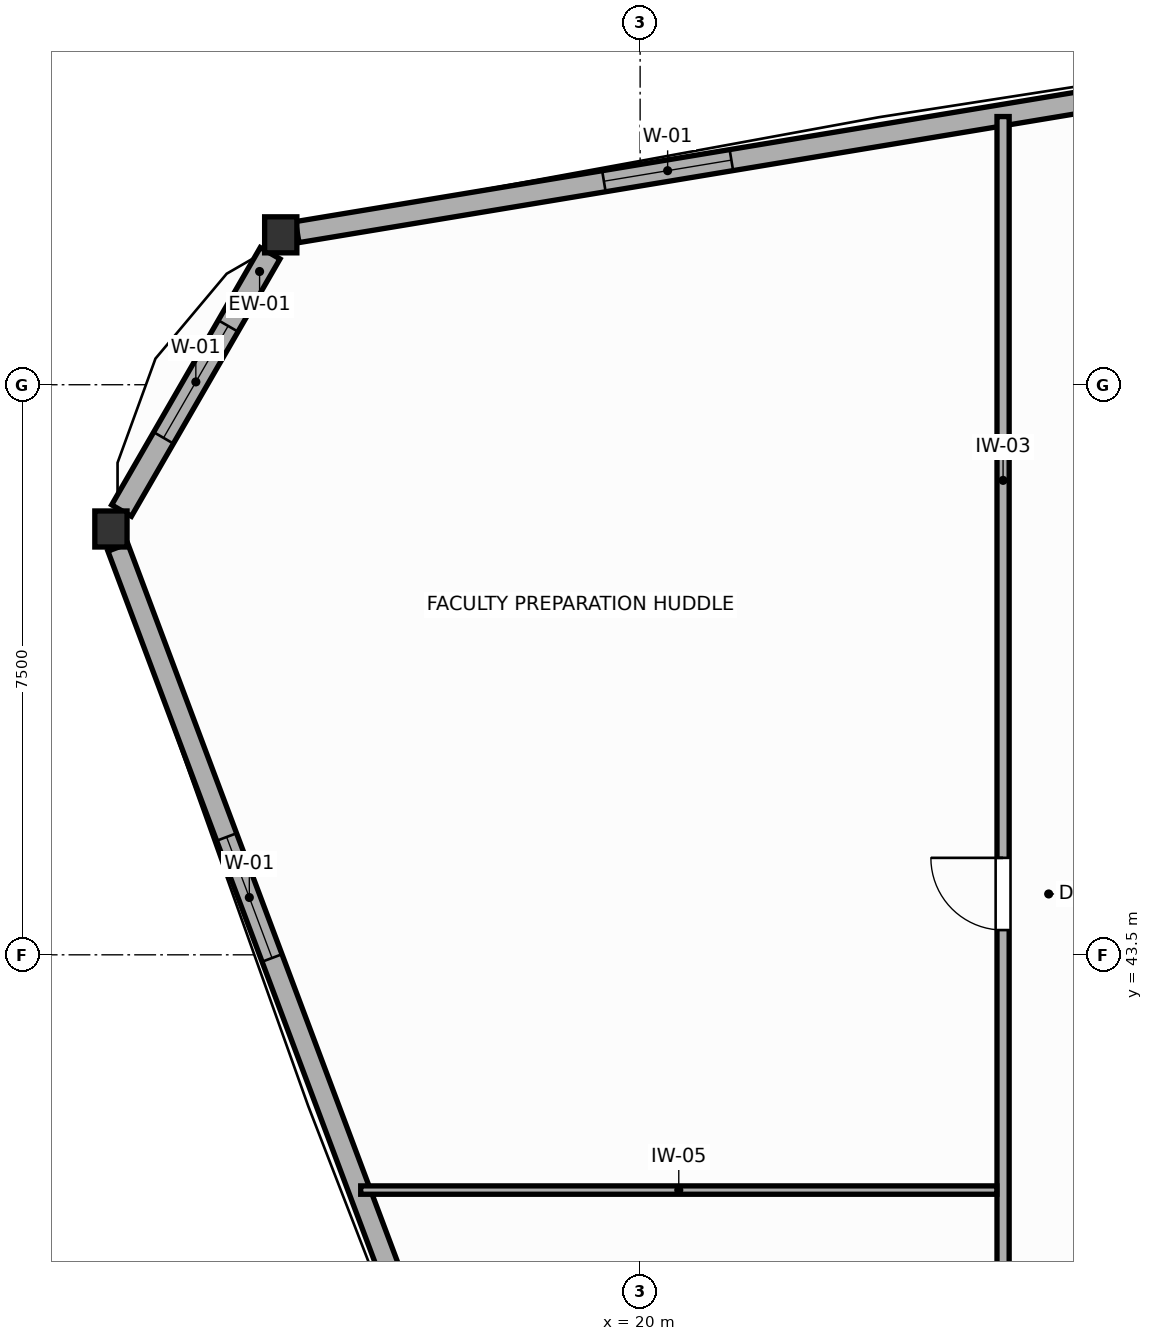
"""IFC4 building model, lengths in metres.
Left out: names, types, materials, properties, quantities, classifications, styles, units other than length and angle.
Written with IfcOpenShell. Run it as: python <this file> out.ifc"""

import sys

from ifc_helpers import new_model, si_unit, direction, frame, frame_2d, origin, origin_2d, place, context, subcontext, project, spatial, rectangle, i_section, extrude, source, transform, mapped, element, fill, save


model = new_model("IFC4")
c1 = context("Model", 3, precision=1e-05, world=origin(), true_north=direction((0.0, 1.0)))
c2 = subcontext(c1, "Body", "Model", "MODEL_VIEW")
j1 = project(units=[si_unit("LENGTHUNIT", "METRE"), si_unit("PLANEANGLEUNIT", "RADIAN")], contexts=[c1])
p1 = place(None, origin())
s1 = spatial("IfcSite", under=j1, at=p1, CompositionType="ELEMENT")
p2 = place(p1, origin())
s2 = spatial("IfcBuilding", under=s1, at=p2, CompositionType="ELEMENT")
p3 = place(p2, frame((0.0, 0.0, 75.6)))
s3 = spatial("IfcBuildingStorey", under=s2, at=p3, CompositionType="ELEMENT", Elevation=75.6)
m1 = source(origin(), c2, "Body", "SweptSolid", [
    extrude(i_section(OverallWidth=0.424, OverallDepth=0.474, WebThickness=0.045, FlangeThickness=0.072, FilletRadius=0.015, at=origin_2d()), origin(), (0.0, 0.0, 1.0), 3.9),
])
for number, where, z_axis, x_axis in (
    (1, (15.272, 52.972, 0.0), (0.0, 0.0, 1.0), (1.0, 0.0, 0.0)),
    (2, (13.038, 49.102, 0.0), (0.0, 0.0, 1.0), (1.0, 0.0, 0.0)),
):
    element("IfcColumn", number, at=place(p3, frame(where, z_axis=z_axis, x_axis=x_axis)), inside=s3, PredefinedType="COLUMN", context=c2, shape_type="MappedRepresentation", body=[
        mapped(m1, transform((0.0, 0.0, 0.0), scale=1.0)),
    ])
p4 = place(p3, frame((32.514, 55.832, 0.0), z_axis=(0.0, 0.0, 1.0), x_axis=(-0.986523610756, -0.163618964122, 0.0)))
e3 = element("IfcWall", 3, at=p4, inside=s3, PredefinedType="SOLIDWALL", context=c2, shape_type="SweptSolid", body=[
    extrude(rectangle(XDim=17.258, YDim=0.28, at=frame_2d((8.629, 0.0))), origin(), (0.0, 0.0, 1.0), 3.23),
])
p5 = place(p4, frame((11.469, 0.0, 0.75)))
e4 = element("IfcOpeningElement", 4, at=p5, cuts=e3, PredefinedType="OPENING", context=c2, shape_type="SweptSolid", body=[
    extrude(rectangle(XDim=1.7, YDim=1.75, at=frame_2d((0.85, 0.875))), frame((0.0, 0.15, 0.0), z_axis=(0.0, -1.0, 0.0), x_axis=(1.0, 0.0, 0.0)), (0.0, 0.0, 1.0), 0.3),
])
p6 = place(p3, frame((15.132, 52.73, 0.0), z_axis=(0.0, 0.0, 1.0), x_axis=(-0.500014353419, -0.866017116675, 0.0)))
e5 = element("IfcWall", 5, at=p6, inside=s3, PredefinedType="SOLIDWALL", context=c2, shape_type="SweptSolid", body=[
    extrude(rectangle(XDim=3.91, YDim=0.3, at=frame_2d((1.955, 0.0))), origin(), (0.0, 0.0, 1.0), 3.23),
])
p7 = place(p6, frame((1.105, 0.0, 0.75)))
e6 = element("IfcOpeningElement", 6, at=p7, cuts=e5, PredefinedType="OPENING", context=c2, shape_type="SweptSolid", body=[
    extrude(rectangle(XDim=1.7, YDim=1.75, at=frame_2d((0.85, 0.875))), frame((0.0, 0.16, 0.0), z_axis=(0.0, -1.0, 0.0), x_axis=(1.0, 0.0, 0.0)), (0.0, 0.0, 1.0), 0.32),
])
p8 = place(p3, frame((13.129, 48.86, 0.0), z_axis=(0.0, 0.0, 1.0), x_axis=(0.351559441404, -0.936165561832, 0.0)))
e7 = element("IfcWall", 7, at=p8, inside=s3, PredefinedType="SOLIDWALL", context=c2, shape_type="SweptSolid", body=[
    extrude(rectangle(XDim=17.181, YDim=0.28, at=frame_2d((8.59, 0.0))), origin(), (0.0, 0.0, 1.0), 3.23),
])
p9 = place(p8, frame((4.07, 0.0, 0.75)))
e8 = element("IfcOpeningElement", 8, at=p9, cuts=e7, PredefinedType="OPENING", context=c2, shape_type="SweptSolid", body=[
    extrude(rectangle(XDim=1.7, YDim=1.75, at=frame_2d((0.85, 0.875))), frame((0.0, 0.15, 0.0), z_axis=(0.0, -1.0, 0.0), x_axis=(1.0, 0.0, 0.0)), (0.0, 0.0, 1.0), 0.3),
])
p10 = place(p3, frame((24.775, 32.31, 0.0), z_axis=(0.0, 0.0, 1.0), x_axis=(0.0, 1.0, 0.0)))
e9 = element("IfcWall", 9, at=p10, inside=s3, PredefinedType="PARTITIONING", context=c2, shape_type="SweptSolid", body=[
    extrude(rectangle(XDim=22.218, YDim=0.16, at=frame_2d((11.109, 0.0))), origin(), (0.0, 0.0, 1.0), 3.68),
])
p11 = place(p10, frame((3.005, 0.0, 0.0)))
e10 = element("IfcOpeningElement", 10, at=p11, cuts=e9, PredefinedType="OPENING", context=c2, shape_type="SweptSolid", body=[
    extrude(rectangle(XDim=0.95, YDim=2.05, at=frame_2d((0.475, 1.025))), frame((0.0, 0.09, 0.0), z_axis=(0.0, -1.0, 0.0), x_axis=(1.0, 0.0, 0.0)), (0.0, 0.0, 1.0), 0.18),
])
p12 = place(p10, frame((11.516, 0.0, 0.0)))
e11 = element("IfcOpeningElement", 11, at=p12, cuts=e9, PredefinedType="OPENING", context=c2, shape_type="SweptSolid", body=[
    extrude(rectangle(XDim=0.95, YDim=2.05, at=frame_2d((0.475, 1.025))), frame((0.0, 0.09, 0.0), z_axis=(0.0, -1.0, 0.0), x_axis=(1.0, 0.0, 0.0)), (0.0, 0.0, 1.0), 0.18),
])
p13 = place(p3, frame((16.324, 40.405, 0.0), z_axis=(0.0, 0.0, 1.0), x_axis=(1.0, 0.0, 0.0)))
e12 = element("IfcWall", 12, at=p13, inside=s3, PredefinedType="MOVABLE", context=c2, shape_type="SweptSolid", body=[
    extrude(rectangle(XDim=8.369, YDim=0.11, at=frame_2d((4.185, 0.0))), origin(), (0.0, 0.0, 1.0), 3.68),
])
p14 = place(p5, origin())
e13 = element("IfcWindow", 13, at=p14, inside=s3, PartitioningType="SINGLE_PANEL", PredefinedType="WINDOW", context=c2, shape_type="SweptSolid", body=[
    extrude(rectangle(XDim=1.7, YDim=1.75, at=frame_2d((0.85, 0.875))), frame((0.0, 0.03, 0.0), z_axis=(0.0, -1.0, 0.0), x_axis=(1.0, 0.0, 0.0)), (0.0, 0.0, 1.0), 0.06),
])
fill(e4, e13)
p15 = place(p7, origin())
e14 = element("IfcWindow", 14, at=p15, inside=s3, PartitioningType="SINGLE_PANEL", PredefinedType="WINDOW", context=c2, shape_type="SweptSolid", body=[
    extrude(rectangle(XDim=1.7, YDim=1.75, at=frame_2d((0.85, 0.875))), frame((0.0, 0.03, 0.0), z_axis=(0.0, -1.0, 0.0), x_axis=(1.0, 0.0, 0.0)), (0.0, 0.0, 1.0), 0.06),
])
fill(e6, e14)
p16 = place(p9, origin())
e15 = element("IfcWindow", 15, at=p16, inside=s3, PartitioningType="SINGLE_PANEL", PredefinedType="WINDOW", context=c2, shape_type="SweptSolid", body=[
    extrude(rectangle(XDim=1.7, YDim=1.75, at=frame_2d((0.85, 0.875))), frame((0.0, 0.03, 0.0), z_axis=(0.0, -1.0, 0.0), x_axis=(1.0, 0.0, 0.0)), (0.0, 0.0, 1.0), 0.06),
])
fill(e8, e15)
p17 = place(p12, origin())
e16 = element("IfcDoor", 16, at=p17, inside=s3, OperationType="SINGLE_SWING_RIGHT", PredefinedType="DOOR", context=c2, shape_type="SweptSolid", body=[
    extrude(rectangle(XDim=0.95, YDim=2.05, at=frame_2d((0.475, 1.025))), frame((0.0, 0.025, 0.0), z_axis=(0.0, -1.0, 0.0), x_axis=(1.0, 0.0, 0.0)), (0.0, 0.0, 1.0), 0.05),
])
fill(e11, e16)
save(model, sys.argv[1])
